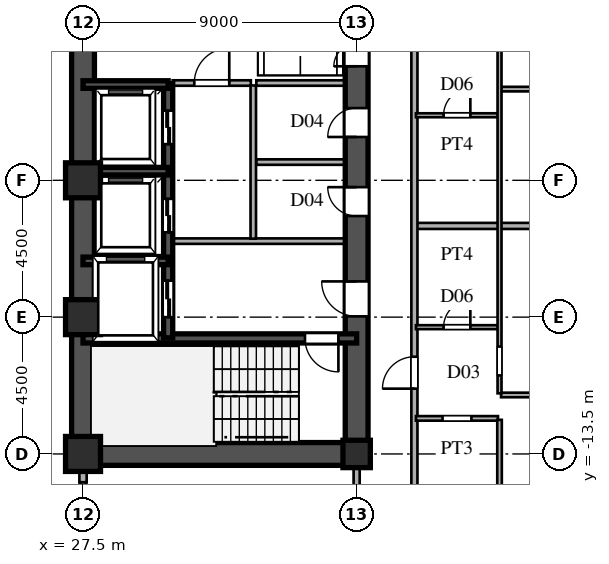
"""IFC4 building model, lengths in metres.
Left out: names, types, materials, properties, quantities, classifications, styles, units other than length and angle.
Written with IfcOpenShell. Run it as: python <this file> out.ifc"""

import sys

from ifc_helpers import new_model, si_unit, direction, frame, frame_2d, origin, origin_2d, place, context, subcontext, project, spatial, rectangle, hollow_rectangle, i_section, extrude, source, transform, mapped, element, fill, save


model = new_model("IFC4")
c1 = context("Model", 3, precision=1e-05, world=origin(), true_north=direction((0.0, 1.0)))
c2 = subcontext(c1, "Body", "Model", "MODEL_VIEW")
j1 = project(units=[si_unit("LENGTHUNIT", "METRE"), si_unit("PLANEANGLEUNIT", "RADIAN")], contexts=[c1])
p1 = place(None, origin())
s1 = spatial("IfcSite", under=j1, at=p1, CompositionType="ELEMENT")
p2 = place(p1, origin())
s2 = spatial("IfcBuilding", under=s1, at=p2, CompositionType="ELEMENT")
p3 = place(p2, frame((0.0, 0.0, 26.1)))
s3 = spatial("IfcBuildingStorey", under=s2, at=p3, CompositionType="ELEMENT", Elevation=26.1)
m1 = source(origin(), c2, "Body", "SweptSolid", [
    extrude(hollow_rectangle(XDim=1.15, YDim=1.15, WallThickness=0.048, at=origin_2d()), origin(), (0.0, 0.0, 1.0), 3.6),
])
for number, where, z_axis, x_axis in (
    (1, (27.5, -13.5, 0.0), (0.0, 0.0, 1.0), (1.0, 0.0, 0.0)),
    (2, (27.5, -9.0, 0.0), (0.0, 0.0, 1.0), (1.0, 0.0, 0.0)),
    (3, (27.5, -4.5, 0.0), (0.0, 0.0, 1.0), (1.0, 0.0, 0.0)),
):
    element("IfcColumn", number, at=place(p3, frame(where, z_axis=z_axis, x_axis=x_axis)), inside=s3, PredefinedType="COLUMN", context=c2, shape_type="MappedRepresentation", body=[
        mapped(m1, transform((0.0, 0.0, 0.0), scale=1.0)),
    ])
m2 = source(origin(), c2, "Body", "SweptSolid", [
    extrude(i_section(OverallWidth=0.9, OverallDepth=0.9, WebThickness=0.036, FlangeThickness=0.055, at=origin_2d()), origin(), (0.0, 0.0, 1.0), 3.6),
])
p4 = place(p3, frame((36.5, -13.5, 0.0), z_axis=(0.0, 0.0, 1.0), x_axis=(1.0, 0.0, 0.0)))
e4 = element("IfcColumn", 4, at=p4, inside=s3, PredefinedType="COLUMN", context=c2, shape_type="MappedRepresentation", body=[
    mapped(m2, transform((0.0, 0.0, 0.0), scale=1.0)),
])
p5 = place(p3, frame((27.5, -14.43, 0.0), z_axis=(0.0, 0.0, 1.0), x_axis=(0.0, 1.0, 0.0)))
e5 = element("IfcWall", 5, at=p5, inside=s3, PredefinedType="SOLIDWALL", context=c2, shape_type="SweptSolid", body=[
    extrude(rectangle(XDim=0.55, YDim=0.24, at=frame_2d((0.275, 0.0))), origin(), (0.0, 0.0, 1.0), 2.88),
])
p6 = place(p3, frame((27.5, -13.5, 0.0), z_axis=(0.0, 0.0, 1.0), x_axis=(0.0, 1.0, 0.0)))
e6 = element("IfcWall", 6, at=p6, inside=s3, PredefinedType="SHEAR", context=c2, shape_type="SweptSolid", body=[
    extrude(rectangle(XDim=12.2, YDim=0.75, at=frame_2d((6.1, 0.0))), origin(), (0.0, 0.0, 1.0), 3.38),
])
p7 = place(p3, frame((27.5, -1.3, 0.0), z_axis=(0.0, 0.0, 1.0), x_axis=(0.0, 1.0, 0.0)))
e7 = element("IfcWall", 7, at=p7, inside=s3, PredefinedType="SHEAR", context=c2, shape_type="SweptSolid", body=[
    extrude(rectangle(XDim=2.6, YDim=0.75, at=frame_2d((1.3, 0.0))), origin(), (0.0, 0.0, 1.0), 3.38),
])
p8 = place(p3, frame((27.5, -13.5, 0.0), z_axis=(0.0, 0.0, 1.0), x_axis=(1.0, 0.0, 0.0)))
e8 = element("IfcWall", 8, at=p8, inside=s3, PredefinedType="SHEAR", context=c2, shape_type="SweptSolid", body=[
    extrude(rectangle(XDim=9.0, YDim=0.75, at=frame_2d((4.5, 0.0))), origin(), (0.0, 0.0, 1.0), 3.38),
])
p9 = place(p3, frame((36.5, -13.65, 0.0), z_axis=(0.0, 0.0, 1.0), x_axis=(0.0, 1.0, 0.0)))
e9 = element("IfcWall", 9, at=p9, inside=s3, PredefinedType="SHEAR", context=c2, shape_type="SweptSolid", body=[
    extrude(rectangle(XDim=7.15, YDim=0.75, at=frame_2d((3.575, 0.0))), origin(), (0.0, 0.0, 1.0), 3.38),
])
p10 = place(p9, frame((4.675, 0.0, 0.0)))
e10 = element("IfcOpeningElement", 10, at=p10, cuts=e9, PredefinedType="OPENING", context=c2, shape_type="SweptSolid", body=[
    extrude(rectangle(XDim=1.15, YDim=2.2, at=frame_2d((0.575, 1.1))), frame((0.0, 0.385, 0.0), z_axis=(0.0, -1.0, 0.0), x_axis=(1.0, 0.0, 0.0)), (0.0, 0.0, 1.0), 0.77),
])
p11 = place(p3, frame((36.5, -1.3, 0.0), z_axis=(0.0, 0.0, 1.0), x_axis=(0.0, 1.0, 0.0)))
e11 = element("IfcWall", 11, at=p11, inside=s3, PredefinedType="SHEAR", context=c2, shape_type="SweptSolid", body=[
    extrude(rectangle(XDim=2.6, YDim=0.75, at=frame_2d((1.3, 0.0))), origin(), (0.0, 0.0, 1.0), 3.38),
])
p12 = place(p11, frame((0.55, 0.0, 0.0)))
e12 = element("IfcOpeningElement", 12, at=p12, cuts=e11, PredefinedType="OPENING", context=c2, shape_type="SweptSolid", body=[
    extrude(rectangle(XDim=1.5, YDim=2.3, at=frame_2d((0.75, 1.15))), frame((0.0, 0.385, 0.0), z_axis=(0.0, -1.0, 0.0), x_axis=(1.0, 0.0, 0.0)), (0.0, 0.0, 1.0), 0.77),
])
p13 = place(p3, frame((36.5, -6.5, 0.0), z_axis=(0.0, 0.0, 1.0), x_axis=(0.0, 1.0, 0.0)))
e13 = element("IfcWall", 13, at=p13, inside=s3, PredefinedType="SHEAR", context=c2, shape_type="SweptSolid", body=[
    extrude(rectangle(XDim=2.6, YDim=0.75, at=frame_2d((1.3, 0.0))), origin(), (0.0, 0.0, 1.0), 3.38),
])
p14 = place(p13, frame((0.825, 0.0, 0.0)))
e14 = element("IfcOpeningElement", 14, at=p14, cuts=e13, PredefinedType="OPENING", context=c2, shape_type="SweptSolid", body=[
    extrude(rectangle(XDim=0.95, YDim=2.15, at=frame_2d((0.475, 1.075))), frame((0.0, 0.385, 0.0), z_axis=(0.0, -1.0, 0.0), x_axis=(1.0, 0.0, 0.0)), (0.0, 0.0, 1.0), 0.77),
])
p15 = place(p3, frame((36.5, -3.9, 0.0), z_axis=(0.0, 0.0, 1.0), x_axis=(0.0, 1.0, 0.0)))
e15 = element("IfcWall", 15, at=p15, inside=s3, PredefinedType="SHEAR", context=c2, shape_type="SweptSolid", body=[
    extrude(rectangle(XDim=2.6, YDim=0.75, at=frame_2d((1.3, 0.0))), origin(), (0.0, 0.0, 1.0), 3.38),
])
p16 = place(p15, frame((0.825, 0.0, 0.0)))
e16 = element("IfcOpeningElement", 16, at=p16, cuts=e15, PredefinedType="OPENING", context=c2, shape_type="SweptSolid", body=[
    extrude(rectangle(XDim=0.95, YDim=2.15, at=frame_2d((0.475, 1.075))), frame((0.0, 0.385, 0.0), z_axis=(0.0, -1.0, 0.0), x_axis=(1.0, 0.0, 0.0)), (0.0, 0.0, 1.0), 0.77),
])
p17 = place(p3, frame((27.5, -9.7, 0.0), z_axis=(0.0, 0.0, 1.0), x_axis=(1.0, 0.0, 0.0)))
e17 = element("IfcWall", 17, at=p17, inside=s3, PredefinedType="SHEAR", context=c2, shape_type="SweptSolid", body=[
    extrude(rectangle(XDim=9.0, YDim=0.3, at=frame_2d((4.5, 0.0))), origin(), (0.0, 0.0, 1.0), 3.38),
])
p18 = place(p17, frame((7.3, 0.0, 0.0)))
e18 = element("IfcOpeningElement", 18, at=p18, cuts=e17, PredefinedType="OPENING", context=c2, shape_type="SweptSolid", body=[
    extrude(rectangle(XDim=1.1, YDim=2.2, at=frame_2d((0.55, 1.1))), frame((0.0, 0.16, 0.0), z_axis=(0.0, -1.0, 0.0), x_axis=(1.0, 0.0, 0.0)), (0.0, 0.0, 1.0), 0.32),
])
for number, where, z_axis, x_axis in (
    (19, (27.5, -7.15, 0.0), (0.0, 0.0, 1.0), (1.0, 0.0, 0.0)),
    (20, (27.5, -4.2, 0.0), (0.0, 0.0, 1.0), (1.0, 0.0, 0.0)),
    (21, (27.5, -1.35, 0.0), (0.0, 0.0, 1.0), (1.0, 0.0, 0.0)),
):
    element("IfcWall", number, at=place(p3, frame(where, z_axis=z_axis, x_axis=x_axis)), inside=s3, PredefinedType="SHEAR", context=c2, shape_type="SweptSolid", body=[
        extrude(rectangle(XDim=2.8, YDim=0.25, at=frame_2d((1.4, 0.0))), origin(), (0.0, 0.0, 1.0), 3.38),
    ])
p19 = place(p3, frame((30.3, -9.68, 0.0), z_axis=(0.0, 0.0, 1.0), x_axis=(0.0, 1.0, 0.0)))
e22 = element("IfcWall", 22, at=p19, inside=s3, PredefinedType="SHEAR", context=c2, shape_type="SweptSolid", body=[
    extrude(rectangle(XDim=2.56, YDim=0.3, at=frame_2d((1.28, 0.0))), origin(), (0.0, 0.0, 1.0), 3.38),
])
p20 = place(p19, frame((0.68, 0.0, 0.0)))
e23 = element("IfcOpeningElement", 23, at=p20, cuts=e22, PredefinedType="OPENING", context=c2, shape_type="SweptSolid", body=[
    extrude(rectangle(XDim=1.2, YDim=2.25, at=frame_2d((0.6, 1.125))), frame((0.0, 0.16, 0.0), z_axis=(0.0, -1.0, 0.0), x_axis=(1.0, 0.0, 0.0)), (0.0, 0.0, 1.0), 0.32),
])
p21 = place(p3, frame((30.3, -7.12, 0.0), z_axis=(0.0, 0.0, 1.0), x_axis=(0.0, 1.0, 0.0)))
e24 = element("IfcWall", 24, at=p21, inside=s3, PredefinedType="SHEAR", context=c2, shape_type="SweptSolid", body=[
    extrude(rectangle(XDim=2.92, YDim=0.3, at=frame_2d((1.46, 0.0))), origin(), (0.0, 0.0, 1.0), 3.38),
])
p22 = place(p21, frame((0.91, 0.0, 0.0)))
e25 = element("IfcOpeningElement", 25, at=p22, cuts=e24, PredefinedType="OPENING", context=c2, shape_type="SweptSolid", body=[
    extrude(rectangle(XDim=1.1, YDim=2.2, at=frame_2d((0.55, 1.1))), frame((0.0, 0.16, 0.0), z_axis=(0.0, -1.0, 0.0), x_axis=(1.0, 0.0, 0.0)), (0.0, 0.0, 1.0), 0.32),
])
p23 = place(p3, frame((30.3, -4.2, 0.0), z_axis=(0.0, 0.0, 1.0), x_axis=(0.0, 1.0, 0.0)))
e26 = element("IfcWall", 26, at=p23, inside=s3, PredefinedType="SHEAR", context=c2, shape_type="SweptSolid", body=[
    extrude(rectangle(XDim=2.88, YDim=0.3, at=frame_2d((1.44, 0.0))), origin(), (0.0, 0.0, 1.0), 3.38),
])
p24 = place(p23, frame((0.89, 0.0, 0.0)))
e27 = element("IfcOpeningElement", 27, at=p24, cuts=e26, PredefinedType="OPENING", context=c2, shape_type="SweptSolid", body=[
    extrude(rectangle(XDim=1.1, YDim=2.2, at=frame_2d((0.55, 1.1))), frame((0.0, 0.16, 0.0), z_axis=(0.0, -1.0, 0.0), x_axis=(1.0, 0.0, 0.0)), (0.0, 0.0, 1.0), 0.32),
])
p25 = place(p3, frame((30.45, -6.5, 0.0), z_axis=(0.0, 0.0, 1.0), x_axis=(1.0, 0.0, 0.0)))
e28 = element("IfcWall", 28, at=p25, inside=s3, PredefinedType="PARTITIONING", context=c2, shape_type="SweptSolid", body=[
    extrude(rectangle(XDim=5.7, YDim=0.18, at=frame_2d((2.85, 0.0))), origin(), (0.0, 0.0, 1.0), 3.38),
])
p26 = place(p3, frame((33.1, -6.42, 0.0), z_axis=(0.0, 0.0, 1.0), x_axis=(0.0, 1.0, 0.0)))
e29 = element("IfcWall", 29, at=p26, inside=s3, PredefinedType="PARTITIONING", context=c2, shape_type="SweptSolid", body=[
    extrude(rectangle(XDim=5.04, YDim=0.18, at=frame_2d((2.52, 0.0))), origin(), (0.0, 0.0, 1.0), 3.38),
])
p27 = place(p3, frame((30.45, -1.3, 0.0), z_axis=(0.0, 0.0, 1.0), x_axis=(1.0, 0.0, 0.0)))
e30 = element("IfcWall", 30, at=p27, inside=s3, PredefinedType="PARTITIONING", context=c2, shape_type="SweptSolid", body=[
    extrude(rectangle(XDim=2.57, YDim=0.18, at=frame_2d((1.285, 0.0))), origin(), (0.0, 0.0, 1.0), 3.38),
])
p28 = place(p27, frame((0.71, 0.0, 0.0)))
e31 = element("IfcOpeningElement", 31, at=p28, cuts=e30, PredefinedType="OPENING", context=c2, shape_type="SweptSolid", body=[
    extrude(rectangle(XDim=1.15, YDim=2.2, at=frame_2d((0.575, 1.1))), frame((0.0, 0.1, 0.0), z_axis=(0.0, -1.0, 0.0), x_axis=(1.0, 0.0, 0.0)), (0.0, 0.0, 1.0), 0.2),
])
for number, where, z_axis, x_axis in (
    (32, (33.2, -1.3, 0.0), (0.0, 0.0, 1.0), (1.0, 0.0, 0.0)),
    (33, (33.2, -3.9, 0.0), (0.0, 0.0, 1.0), (1.0, 0.0, 0.0)),
):
    element("IfcWall", number, at=place(p3, frame(where, z_axis=z_axis, x_axis=x_axis)), inside=s3, PredefinedType="PARTITIONING", context=c2, shape_type="SweptSolid", body=[
        extrude(rectangle(XDim=2.95, YDim=0.18, at=frame_2d((1.475, 0.0))), origin(), (0.0, 0.0, 1.0), 3.38),
    ])
p29 = place(p3, frame((38.45, -12.33, 0.0), z_axis=(0.0, 0.0, 1.0), x_axis=(1.0, 0.0, 0.0)))
e34 = element("IfcWall", 34, at=p29, inside=s3, PredefinedType="PARTITIONING", context=c2, shape_type="SweptSolid", body=[
    extrude(rectangle(XDim=2.7, YDim=0.15, at=frame_2d((1.35, 0.0))), origin(), (0.0, 0.0, 1.0), 3.38),
])
p30 = place(p29, frame((0.875, 0.0, 0.0)))
e35 = element("IfcOpeningElement", 35, at=p30, cuts=e34, PredefinedType="OPENING", context=c2, shape_type="SweptSolid", body=[
    extrude(rectangle(XDim=0.95, YDim=2.15, at=frame_2d((0.475, 1.075))), frame((0.0, 0.085, 0.0), z_axis=(0.0, -1.0, 0.0), x_axis=(1.0, 0.0, 0.0)), (0.0, 0.0, 1.0), 0.17),
])
p31 = place(p3, frame((41.25, -11.56, 0.0), z_axis=(0.0, 0.0, 1.0), x_axis=(1.0, 0.0, 0.0)))
e36 = element("IfcWall", 36, at=p31, inside=s3, PredefinedType="PARTITIONING", context=c2, shape_type="SweptSolid", body=[
    extrude(rectangle(XDim=27.44, YDim=0.15, at=frame_2d((13.72, 0.0))), origin(), (0.0, 0.0, 1.0), 3.38),
])
p32 = place(p31, frame((2.8, 0.0, 0.0)))
e37 = element("IfcOpeningElement", 37, at=p32, cuts=e36, PredefinedType="OPENING", context=c2, shape_type="SweptSolid", body=[
    extrude(rectangle(XDim=0.95, YDim=2.15, at=frame_2d((0.475, 1.075))), frame((0.0, 0.085, 0.0), z_axis=(0.0, -1.0, 0.0), x_axis=(1.0, 0.0, 0.0)), (0.0, 0.0, 1.0), 0.17),
])
p33 = place(p31, frame((15.625, 0.0, 0.0)))
e38 = element("IfcOpeningElement", 38, at=p33, cuts=e36, PredefinedType="OPENING", context=c2, shape_type="SweptSolid", body=[
    extrude(rectangle(XDim=0.95, YDim=2.15, at=frame_2d((0.475, 1.075))), frame((0.0, 0.085, 0.0), z_axis=(0.0, -1.0, 0.0), x_axis=(1.0, 0.0, 0.0)), (0.0, 0.0, 1.0), 0.17),
])
p34 = place(p3, frame((38.45, -9.33, 0.0), z_axis=(0.0, 0.0, 1.0), x_axis=(1.0, 0.0, 0.0)))
e39 = element("IfcWall", 39, at=p34, inside=s3, PredefinedType="PARTITIONING", context=c2, shape_type="SweptSolid", body=[
    extrude(rectangle(XDim=2.7, YDim=0.13, at=frame_2d((1.35, 0.0))), origin(), (0.0, 0.0, 1.0), 3.38),
])
p35 = place(p34, frame((0.91, 0.0, 0.0)))
e40 = element("IfcOpeningElement", 40, at=p35, cuts=e39, PredefinedType="OPENING", context=c2, shape_type="SweptSolid", body=[
    extrude(rectangle(XDim=0.88, YDim=2.1, at=frame_2d((0.44, 1.05))), frame((0.0, 0.075, 0.0), z_axis=(0.0, -1.0, 0.0), x_axis=(1.0, 0.0, 0.0)), (0.0, 0.0, 1.0), 0.15),
])
p36 = place(p3, frame((38.48, -6.0, 0.0), z_axis=(0.0, 0.0, 1.0), x_axis=(1.0, 0.0, 0.0)))
e41 = element("IfcWall", 41, at=p36, inside=s3, PredefinedType="PARTITIONING", context=c2, shape_type="SweptSolid", body=[
    extrude(rectangle(XDim=34.025, YDim=0.2, at=frame_2d((17.012, 0.0))), origin(), (0.0, 0.0, 1.0), 3.38),
])
p37 = place(p3, frame((38.45, -2.36, 0.0), z_axis=(0.0, 0.0, 1.0), x_axis=(1.0, 0.0, 0.0)))
e42 = element("IfcWall", 42, at=p37, inside=s3, PredefinedType="PARTITIONING", context=c2, shape_type="SweptSolid", body=[
    extrude(rectangle(XDim=2.7, YDim=0.13, at=frame_2d((1.35, 0.0))), origin(), (0.0, 0.0, 1.0), 3.38),
])
p38 = place(p37, frame((0.91, 0.0, 0.0)))
e43 = element("IfcOpeningElement", 43, at=p38, cuts=e42, PredefinedType="OPENING", context=c2, shape_type="SweptSolid", body=[
    extrude(rectangle(XDim=0.88, YDim=2.1, at=frame_2d((0.44, 1.05))), frame((0.0, 0.075, 0.0), z_axis=(0.0, -1.0, 0.0), x_axis=(1.0, 0.0, 0.0)), (0.0, 0.0, 1.0), 0.15),
])
p39 = place(p3, frame((41.25, -1.5, 0.0), z_axis=(0.0, 0.0, 1.0), x_axis=(1.0, 0.0, 0.0)))
e44 = element("IfcWall", 44, at=p39, inside=s3, PredefinedType="PARTITIONING", context=c2, shape_type="SweptSolid", body=[
    extrude(rectangle(XDim=31.285, YDim=0.15, at=frame_2d((15.643, 0.0))), origin(), (0.0, 0.0, 1.0), 3.38),
])
p40 = place(p39, frame((2.8, 0.0, 0.0)))
e45 = element("IfcOpeningElement", 45, at=p40, cuts=e44, PredefinedType="OPENING", context=c2, shape_type="SweptSolid", body=[
    extrude(rectangle(XDim=0.95, YDim=2.15, at=frame_2d((0.475, 1.075))), frame((0.0, 0.085, 0.0), z_axis=(0.0, -1.0, 0.0), x_axis=(1.0, 0.0, 0.0)), (0.0, 0.0, 1.0), 0.17),
])
p41 = place(p39, frame((15.625, 0.0, 0.0)))
e46 = element("IfcOpeningElement", 46, at=p41, cuts=e44, PredefinedType="OPENING", context=c2, shape_type="SweptSolid", body=[
    extrude(rectangle(XDim=0.95, YDim=2.15, at=frame_2d((0.475, 1.075))), frame((0.0, 0.085, 0.0), z_axis=(0.0, -1.0, 0.0), x_axis=(1.0, 0.0, 0.0)), (0.0, 0.0, 1.0), 0.17),
])
p42 = place(p3, frame((36.5, -15.515, 0.0), z_axis=(0.0, 0.0, 1.0), x_axis=(0.0, 1.0, 0.0)))
e47 = element("IfcWall", 47, at=p42, inside=s3, PredefinedType="PARTITIONING", context=c2, shape_type="SweptSolid", body=[
    extrude(rectangle(XDim=1.635, YDim=0.2, at=frame_2d((0.817, 0.0))), origin(), (0.0, 0.0, 1.0), 2.68),
])
p43 = place(p3, frame((38.4, -15.515, 0.0), z_axis=(0.0, 0.0, 1.0), x_axis=(0.0, 1.0, 0.0)))
e48 = element("IfcWall", 48, at=p43, inside=s3, PredefinedType="PARTITIONING", context=c2, shape_type="SweptSolid", body=[
    extrude(rectangle(XDim=31.03, YDim=0.2, at=frame_2d((15.515, 0.0))), origin(), (0.0, 0.0, 1.0), 3.38),
])
p44 = place(p43, frame((4.163, 0.0, 0.0)))
e49 = element("IfcOpeningElement", 49, at=p44, cuts=e48, PredefinedType="OPENING", context=c2, shape_type="SweptSolid", body=[
    extrude(rectangle(XDim=1.05, YDim=2.25, at=frame_2d((0.525, 1.125))), frame((0.0, 0.11, 0.0), z_axis=(0.0, -1.0, 0.0), x_axis=(1.0, 0.0, 0.0)), (0.0, 0.0, 1.0), 0.22),
])
p45 = place(p43, frame((15.538, 0.0, 0.0)))
e50 = element("IfcOpeningElement", 50, at=p45, cuts=e48, PredefinedType="OPENING", context=c2, shape_type="SweptSolid", body=[
    extrude(rectangle(XDim=1.05, YDim=2.25, at=frame_2d((0.525, 1.125))), frame((0.0, 0.11, 0.0), z_axis=(0.0, -1.0, 0.0), x_axis=(1.0, 0.0, 0.0)), (0.0, 0.0, 1.0), 0.22),
])
p46 = place(p43, frame((26.635, 0.0, 0.0)))
e51 = element("IfcOpeningElement", 51, at=p46, cuts=e48, PredefinedType="OPENING", context=c2, shape_type="SweptSolid", body=[
    extrude(rectangle(XDim=1.05, YDim=2.25, at=frame_2d((0.525, 1.125))), frame((0.0, 0.11, 0.0), z_axis=(0.0, -1.0, 0.0), x_axis=(1.0, 0.0, 0.0)), (0.0, 0.0, 1.0), 0.22),
])
p47 = place(p3, frame((41.2, -22.704, 0.0), z_axis=(0.0, 0.0, 1.0), x_axis=(0.0, 1.0, 0.0)))
e52 = element("IfcWall", 52, at=p47, inside=s3, PredefinedType="PARTITIONING", context=c2, shape_type="SweptSolid", body=[
    extrude(rectangle(XDim=10.326, YDim=0.15, at=frame_2d((5.163, 0.0))), origin(), (0.0, 0.0, 1.0), 3.38),
])
p48 = place(p3, frame((41.2, -11.506, 0.0), z_axis=(0.0, 0.0, 1.0), x_axis=(0.0, 1.0, 0.0)))
e53 = element("IfcWall", 53, at=p48, inside=s3, PredefinedType="PARTITIONING", context=c2, shape_type="SweptSolid", body=[
    extrude(rectangle(XDim=14.456, YDim=0.13, at=frame_2d((7.228, 0.0))), origin(), (0.0, 0.0, 1.0), 3.38),
])
p49 = place(p48, frame((0.589, 0.0, 0.0)))
e54 = element("IfcOpeningElement", 54, at=p49, cuts=e53, PredefinedType="OPENING", context=c2, shape_type="SweptSolid", body=[
    extrude(rectangle(XDim=0.95, YDim=2.15, at=frame_2d((0.475, 1.075))), frame((0.0, 0.075, 0.0), z_axis=(0.0, -1.0, 0.0), x_axis=(1.0, 0.0, 0.0)), (0.0, 0.0, 1.0), 0.15),
])
p50 = place(p48, frame((11.781, 0.0, 0.0)))
e55 = element("IfcOpeningElement", 55, at=p50, cuts=e53, PredefinedType="OPENING", context=c2, shape_type="SweptSolid", body=[
    extrude(rectangle(XDim=0.95, YDim=2.15, at=frame_2d((0.475, 1.075))), frame((0.0, 0.075, 0.0), z_axis=(0.0, -1.0, 0.0), x_axis=(1.0, 0.0, 0.0)), (0.0, 0.0, 1.0), 0.15),
])
m3 = source(origin(), c2, "Body", "SweptSolid", [
    extrude(rectangle(XDim=1.15, YDim=2.2, at=frame_2d((0.575, 1.1))), frame((0.0, 0.025, 0.0), z_axis=(0.0, -1.0, 0.0), x_axis=(1.0, 0.0, 0.0)), (0.0, 0.0, 1.0), 0.05),
])
p51 = place(p10, origin())
e56 = element("IfcDoor", 56, at=p51, inside=s3, OperationType="SINGLE_SWING_RIGHT", PredefinedType="DOOR", context=c2, shape_type="MappedRepresentation", body=[
    mapped(m3, transform((0.0, 0.0, 0.0), scale=1.0)),
])
fill(e10, e56)
m4 = source(origin(), c2, "Body", "SweptSolid", [
    extrude(rectangle(XDim=1.5, YDim=2.3, at=frame_2d((0.75, 1.15))), frame((0.0, 0.025, 0.0), z_axis=(0.0, -1.0, 0.0), x_axis=(1.0, 0.0, 0.0)), (0.0, 0.0, 1.0), 0.05),
])
p52 = place(p12, origin())
e57 = element("IfcDoor", 57, at=p52, inside=s3, OperationType="DOUBLE_SWING_LEFT", PredefinedType="DOOR", context=c2, shape_type="MappedRepresentation", body=[
    mapped(m4, transform((0.0, 0.0, 0.0), scale=1.0)),
])
fill(e12, e57)
m5 = source(origin(), c2, "Body", "SweptSolid", [
    extrude(rectangle(XDim=0.95, YDim=2.15, at=frame_2d((0.475, 1.075))), frame((0.0, 0.025, 0.0), z_axis=(0.0, -1.0, 0.0), x_axis=(1.0, 0.0, 0.0)), (0.0, 0.0, 1.0), 0.05),
])
p53 = place(p14, origin())
e58 = element("IfcDoor", 58, at=p53, inside=s3, OperationType="SINGLE_SWING_RIGHT", PredefinedType="DOOR", context=c2, shape_type="MappedRepresentation", body=[
    mapped(m5, transform((0.0, 0.0, 0.0), scale=1.0)),
])
fill(e14, e58)
p54 = place(p16, origin())
e59 = element("IfcDoor", 59, at=p54, inside=s3, OperationType="SINGLE_SWING_LEFT", PredefinedType="DOOR", context=c2, shape_type="MappedRepresentation", body=[
    mapped(m5, transform((0.0, 0.0, 0.0), scale=1.0)),
])
fill(e16, e59)
m6 = source(origin(), c2, "Body", "SweptSolid", [
    extrude(rectangle(XDim=1.1, YDim=2.2, at=frame_2d((0.55, 1.1))), frame((0.0, 0.025, 0.0), z_axis=(0.0, -1.0, 0.0), x_axis=(1.0, 0.0, 0.0)), (0.0, 0.0, 1.0), 0.05),
])
p55 = place(p18, frame((1.1, 0.0, 0.0), z_axis=(0.0, 0.0, 1.0), x_axis=(-1.0, 0.0, 0.0)))
e60 = element("IfcDoor", 60, at=p55, inside=s3, OperationType="SINGLE_SWING_RIGHT", PredefinedType="DOOR", context=c2, shape_type="MappedRepresentation", body=[
    mapped(m6, transform((0.0, 0.0, 0.0), scale=1.0)),
])
fill(e18, e60)
m7 = source(origin(), c2, "Body", "SweptSolid", [
    extrude(rectangle(XDim=1.2, YDim=2.25, at=frame_2d((0.6, 1.125))), frame((0.0, 0.025, 0.0), z_axis=(0.0, -1.0, 0.0), x_axis=(1.0, 0.0, 0.0)), (0.0, 0.0, 1.0), 0.05),
])
p56 = place(p20, origin())
e61 = element("IfcDoor", 61, at=p56, inside=s3, OperationType="DOUBLE_DOOR_SLIDING", PredefinedType="DOOR", context=c2, shape_type="MappedRepresentation", body=[
    mapped(m7, transform((0.0, 0.0, 0.0), scale=1.0)),
])
fill(e23, e61)
m8 = source(origin(), c2, "Body", "SweptSolid", [
    extrude(rectangle(XDim=1.1, YDim=2.2, at=frame_2d((0.55, 1.1))), frame((0.0, 0.025, 0.0), z_axis=(0.0, -1.0, 0.0), x_axis=(1.0, 0.0, 0.0)), (0.0, 0.0, 1.0), 0.05),
])
p57 = place(p22, origin())
e62 = element("IfcDoor", 62, at=p57, inside=s3, OperationType="DOUBLE_DOOR_SLIDING", PredefinedType="DOOR", context=c2, shape_type="MappedRepresentation", body=[
    mapped(m8, transform((0.0, 0.0, 0.0), scale=1.0)),
])
fill(e25, e62)
p58 = place(p24, origin())
e63 = element("IfcDoor", 63, at=p58, inside=s3, OperationType="DOUBLE_DOOR_SLIDING", PredefinedType="DOOR", context=c2, shape_type="MappedRepresentation", body=[
    mapped(m8, transform((0.0, 0.0, 0.0), scale=1.0)),
])
fill(e27, e63)
p59 = place(p28, origin())
e64 = element("IfcDoor", 64, at=p59, inside=s3, OperationType="SINGLE_SWING_RIGHT", PredefinedType="DOOR", context=c2, shape_type="MappedRepresentation", body=[
    mapped(m3, transform((0.0, 0.0, 0.0), scale=1.0)),
])
fill(e31, e64)
m9 = source(origin(), c2, "Body", "SweptSolid", [
    extrude(rectangle(XDim=0.88, YDim=2.1, at=frame_2d((0.44, 1.05))), frame((0.0, 0.025, 0.0), z_axis=(0.0, -1.0, 0.0), x_axis=(1.0, 0.0, 0.0)), (0.0, 0.0, 1.0), 0.05),
])
p60 = place(p35, origin())
e65 = element("IfcDoor", 65, at=p60, inside=s3, OperationType="SINGLE_SWING_RIGHT", PredefinedType="DOOR", context=c2, shape_type="MappedRepresentation", body=[
    mapped(m9, transform((0.0, 0.0, 0.0), scale=1.0)),
])
fill(e40, e65)
p61 = place(p38, origin())
e66 = element("IfcDoor", 66, at=p61, inside=s3, OperationType="SINGLE_SWING_RIGHT", PredefinedType="DOOR", context=c2, shape_type="MappedRepresentation", body=[
    mapped(m9, transform((0.0, 0.0, 0.0), scale=1.0)),
])
fill(e43, e66)
m10 = source(origin(), c2, "Body", "SweptSolid", [
    extrude(rectangle(XDim=1.05, YDim=2.25, at=frame_2d((0.525, 1.125))), frame((0.0, 0.025, 0.0), z_axis=(0.0, -1.0, 0.0), x_axis=(1.0, 0.0, 0.0)), (0.0, 0.0, 1.0), 0.05),
])
p62 = place(p44, origin())
e67 = element("IfcDoor", 67, at=p62, inside=s3, OperationType="SINGLE_SWING_LEFT", PredefinedType="DOOR", context=c2, shape_type="MappedRepresentation", body=[
    mapped(m10, transform((0.0, 0.0, 0.0), scale=1.0)),
])
fill(e49, e67)
save(model, sys.argv[1])
